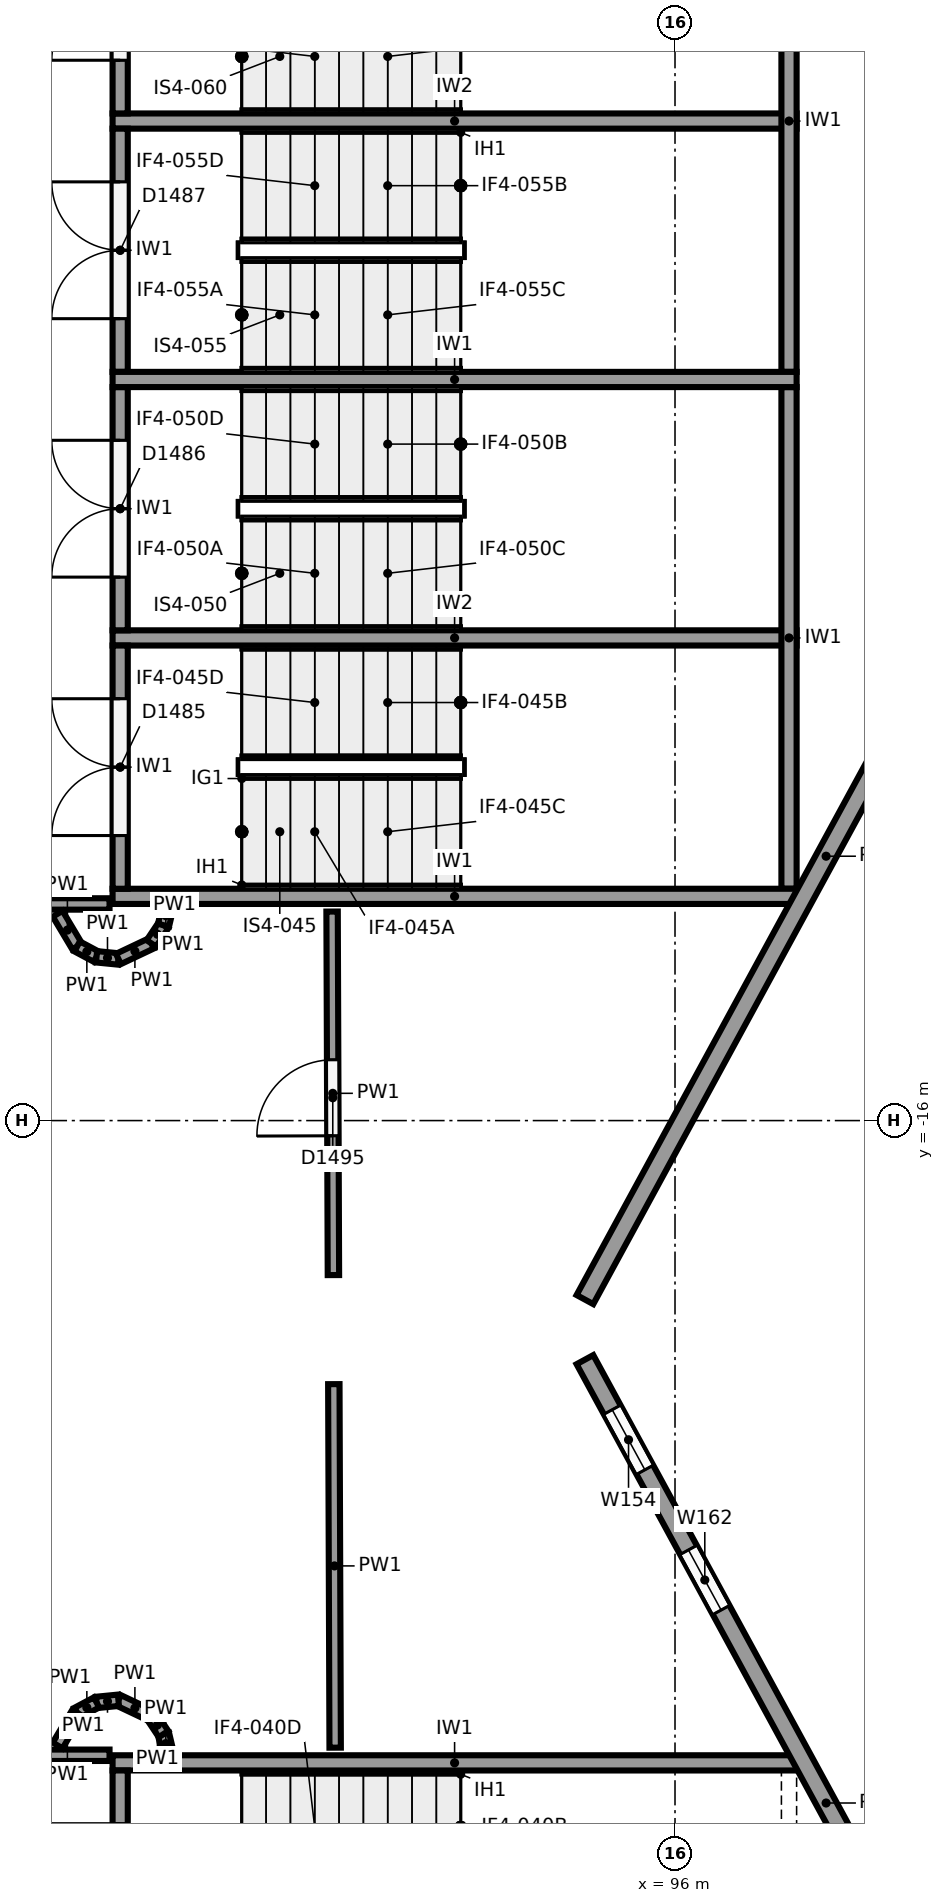
"""IFC4 building model, lengths in metres.
Left out: names, types, materials, properties, quantities, classifications, styles, units other than length and angle.
Written with IfcOpenShell. Run it as: python <this file> out.ifc"""

import sys

from ifc_helpers import new_model, si_unit, direction, frame, frame_2d, origin, origin_2d, place, context, subcontext, project, spatial, rectangle, circle, extrude, element, fill, save


model = new_model("IFC4")
c1 = context("Model", 3, precision=1e-05, world=origin(), true_north=direction((0.0, 1.0)))
c2 = subcontext(c1, "Body", "Model", "MODEL_VIEW")
j1 = project(units=[si_unit("LENGTHUNIT", "METRE"), si_unit("PLANEANGLEUNIT", "RADIAN")], contexts=[c1])
p1 = place(None, origin())
s1 = spatial("IfcSite", under=j1, at=p1, CompositionType="ELEMENT")
p2 = place(p1, origin())
s2 = spatial("IfcBuilding", under=s1, at=p2, CompositionType="ELEMENT")
p3 = place(p2, frame((0.0, 0.0, 18.0)))
s3 = spatial("IfcBuildingStorey", under=s2, at=p3, CompositionType="ELEMENT", Elevation=18.0)
p4 = place(p3, frame((94.6, -18.75, 0.0), z_axis=(0.0, 0.0, 1.0), x_axis=(1.0, 0.0, 0.0)))
e1 = element("IfcColumn", 1, at=p4, inside=s3, PredefinedType="COLUMN", context=c2, shape_type="SweptSolid", body=[
    extrude(circle(Radius=0.45, at=origin_2d()), origin(), (0.0, 0.0, 1.0), 6.0),
])
p5 = place(p3, frame((94.815, -19.145, 0.0), z_axis=(0.0, 0.0, 1.0), x_axis=(0.477867771117, -0.878431780691, 0.0)))
e2 = element("IfcWall", 2, at=p5, inside=s3, PredefinedType="SOLIDWALL", context=c2, shape_type="SweptSolid", body=[
    extrude(rectangle(XDim=13.28, YDim=0.25, at=frame_2d((6.64, 0.0))), origin(), (0.0, 0.0, 1.0), 4.3),
])
p6 = place(p5, frame((0.75, 0.0, 1.0)))
e3 = element("IfcOpeningElement", 3, at=p6, cuts=e2, PredefinedType="OPENING", context=c2, shape_type="SweptSolid", body=[
    extrude(rectangle(XDim=0.9, YDim=3.25, at=frame_2d((0.45, 1.625))), frame((0.0, 0.135, 0.0), z_axis=(0.0, -1.0, 0.0), x_axis=(1.0, 0.0, 0.0)), (0.0, 0.0, 1.0), 0.27),
])
p7 = place(p5, frame((2.85, 0.0, 1.0)))
e4 = element("IfcOpeningElement", 4, at=p7, cuts=e2, PredefinedType="OPENING", context=c2, shape_type="SweptSolid", body=[
    extrude(rectangle(XDim=0.9, YDim=3.25, at=frame_2d((0.45, 1.625))), frame((0.0, 0.135, 0.0), z_axis=(0.0, -1.0, 0.0), x_axis=(1.0, 0.0, 0.0)), (0.0, 0.0, 1.0), 0.27),
])
p8 = place(p5, frame((11.25, 0.0, 1.0)))
e5 = element("IfcOpeningElement", 5, at=p8, cuts=e2, PredefinedType="OPENING", context=c2, shape_type="SweptSolid", body=[
    extrude(rectangle(XDim=0.9, YDim=3.25, at=frame_2d((0.45, 1.625))), frame((0.0, 0.135, 0.0), z_axis=(0.0, -1.0, 0.0), x_axis=(1.0, 0.0, 0.0)), (0.0, 0.0, 1.0), 0.27),
])
p9 = place(p3, frame((101.161, -6.689, 0.0), z_axis=(0.0, 0.0, 1.0), x_axis=(-0.477867771117, -0.878431780691, 0.0)))
e6 = element("IfcWall", 6, at=p9, inside=s3, PredefinedType="SOLIDWALL", context=c2, shape_type="SweptSolid", body=[
    extrude(rectangle(XDim=13.28, YDim=0.25, at=frame_2d((6.64, 0.0))), origin(), (0.0, 0.0, 1.0), 4.3),
])
p10 = place(p3, frame((94.815, 5.855, 0.0), z_axis=(0.0, 0.0, 1.0), x_axis=(0.477867771117, -0.878431780691, 0.0)))
e7 = element("IfcWall", 7, at=p10, inside=s3, PredefinedType="SOLIDWALL", context=c2, shape_type="SweptSolid", body=[
    extrude(rectangle(XDim=13.28, YDim=0.25, at=frame_2d((6.64, 0.0))), origin(), (0.0, 0.0, 1.0), 4.3),
])
p11 = place(p10, frame((0.75, 0.0, 1.0)))
e8 = element("IfcOpeningElement", 8, at=p11, cuts=e7, PredefinedType="OPENING", context=c2, shape_type="SweptSolid", body=[
    extrude(rectangle(XDim=0.9, YDim=3.25, at=frame_2d((0.45, 1.625))), frame((0.0, 0.135, 0.0), z_axis=(0.0, -1.0, 0.0), x_axis=(1.0, 0.0, 0.0)), (0.0, 0.0, 1.0), 0.27),
])
p12 = place(p10, frame((2.85, 0.0, 1.0)))
e9 = element("IfcOpeningElement", 9, at=p12, cuts=e7, PredefinedType="OPENING", context=c2, shape_type="SweptSolid", body=[
    extrude(rectangle(XDim=0.9, YDim=3.25, at=frame_2d((0.45, 1.625))), frame((0.0, 0.135, 0.0), z_axis=(0.0, -1.0, 0.0), x_axis=(1.0, 0.0, 0.0)), (0.0, 0.0, 1.0), 0.27),
])
p13 = place(p10, frame((11.25, 0.0, 1.0)))
e10 = element("IfcOpeningElement", 10, at=p13, cuts=e7, PredefinedType="OPENING", context=c2, shape_type="SweptSolid", body=[
    extrude(rectangle(XDim=0.9, YDim=3.25, at=frame_2d((0.45, 1.625))), frame((0.0, 0.135, 0.0), z_axis=(0.0, -1.0, 0.0), x_axis=(1.0, 0.0, 0.0)), (0.0, 0.0, 1.0), 0.27),
])
p14 = place(p3, frame((97.6, -24.45, 0.0), z_axis=(0.0, 0.0, 1.0), x_axis=(-1.0, 0.0, 0.0)))
e11 = element("IfcWall", 11, at=p14, inside=s3, PredefinedType="SHEAR", context=c2, shape_type="SweptSolid", body=[
    extrude(rectangle(XDim=9.0, YDim=0.2, at=frame_2d((4.5, 0.0))), origin(), (0.0, 0.0, 1.0), 5.6),
])
p15 = place(p3, frame((97.5, -31.15, 0.0), z_axis=(0.0, 0.0, 1.0), x_axis=(0.0, 1.0, 0.0)))
e12 = element("IfcWall", 12, at=p15, inside=s3, PredefinedType="SHEAR", context=c2, shape_type="SweptSolid", body=[
    extrude(rectangle(XDim=6.6, YDim=0.2, at=frame_2d((3.3, 0.0))), origin(), (0.0, 0.0, 1.0), 5.6),
])
p16 = place(p3, frame((88.7, -27.75, 0.0), z_axis=(0.0, 0.0, 1.0), x_axis=(0.0, 1.0, 0.0)))
e13 = element("IfcWall", 13, at=p16, inside=s3, PredefinedType="SHEAR", context=c2, shape_type="SweptSolid", body=[
    extrude(rectangle(XDim=3.2, YDim=0.2, at=frame_2d((1.6, 0.0))), origin(), (0.0, 0.0, 1.0), 5.6),
])
p17 = place(p16, frame((0.7, 0.0, 0.0)))
e14 = element("IfcOpeningElement", 14, at=p17, cuts=e13, PredefinedType="OPENING", context=c2, shape_type="SweptSolid", body=[
    extrude(rectangle(XDim=1.8, YDim=2.1, at=frame_2d((0.9, 1.05))), frame((0.0, 0.11, 0.0), z_axis=(0.0, -1.0, 0.0), x_axis=(1.0, 0.0, 0.0)), (0.0, 0.0, 1.0), 0.22),
])
for number, where, z_axis, x_axis in (
    (15, (97.6, -13.05, 0.0), (0.0, 0.0, 1.0), (-1.0, 0.0, 0.0)),
    (16, (97.6, -6.25, 0.0), (0.0, 0.0, 1.0), (-1.0, 0.0, 0.0)),
):
    element("IfcWall", number, at=place(p3, frame(where, z_axis=z_axis, x_axis=x_axis)), inside=s3, PredefinedType="SHEAR", context=c2, shape_type="SweptSolid", body=[
        extrude(rectangle(XDim=9.0, YDim=0.2, at=frame_2d((4.5, 0.0))), origin(), (0.0, 0.0, 1.0), 5.6),
    ])
for number, where, z_axis, x_axis in (
    (17, (97.5, -12.95, 0.0), (0.0, 0.0, 1.0), (0.0, 1.0, 0.0)),
    (18, (97.5, -6.15, 0.0), (0.0, 0.0, 1.0), (0.0, 1.0, 0.0)),
):
    element("IfcWall", number, at=place(p3, frame(where, z_axis=z_axis, x_axis=x_axis)), inside=s3, PredefinedType="SHEAR", context=c2, shape_type="SweptSolid", body=[
        extrude(rectangle(XDim=6.6, YDim=0.2, at=frame_2d((3.3, 0.0))), origin(), (0.0, 0.0, 1.0), 5.6),
    ])
for number, where, z_axis, x_axis in (
    (19, (97.6, -9.65, 0.0), (0.0, 0.0, 1.0), (-1.0, 0.0, 0.0)),
    (20, (97.6, -2.85, 0.0), (0.0, 0.0, 1.0), (-1.0, 0.0, 0.0)),
):
    element("IfcWall", number, at=place(p3, frame(where, z_axis=z_axis, x_axis=x_axis)), inside=s3, PredefinedType="SHEAR", context=c2, shape_type="SweptSolid", body=[
        extrude(rectangle(XDim=9.0, YDim=0.2, at=frame_2d((4.5, 0.0))), origin(), (0.0, 0.0, 1.0), 5.6),
    ])
p18 = place(p3, frame((88.7, -12.95, 0.0), z_axis=(0.0, 0.0, 1.0), x_axis=(0.0, 1.0, 0.0)))
e21 = element("IfcWall", 21, at=p18, inside=s3, PredefinedType="SHEAR", context=c2, shape_type="SweptSolid", body=[
    extrude(rectangle(XDim=3.2, YDim=0.2, at=frame_2d((1.6, 0.0))), origin(), (0.0, 0.0, 1.0), 5.6),
])
p19 = place(p18, frame((0.7, 0.0, 0.0)))
e22 = element("IfcOpeningElement", 22, at=p19, cuts=e21, PredefinedType="OPENING", context=c2, shape_type="SweptSolid", body=[
    extrude(rectangle(XDim=1.8, YDim=2.1, at=frame_2d((0.9, 1.05))), frame((0.0, 0.11, 0.0), z_axis=(0.0, -1.0, 0.0), x_axis=(1.0, 0.0, 0.0)), (0.0, 0.0, 1.0), 0.22),
])
p20 = place(p3, frame((88.7, -9.55, 0.0), z_axis=(0.0, 0.0, 1.0), x_axis=(0.0, 1.0, 0.0)))
e23 = element("IfcWall", 23, at=p20, inside=s3, PredefinedType="SHEAR", context=c2, shape_type="SweptSolid", body=[
    extrude(rectangle(XDim=3.2, YDim=0.2, at=frame_2d((1.6, 0.0))), origin(), (0.0, 0.0, 1.0), 5.6),
])
p21 = place(p20, frame((0.7, 0.0, 0.0)))
e24 = element("IfcOpeningElement", 24, at=p21, cuts=e23, PredefinedType="OPENING", context=c2, shape_type="SweptSolid", body=[
    extrude(rectangle(XDim=1.8, YDim=2.1, at=frame_2d((0.9, 1.05))), frame((0.0, 0.11, 0.0), z_axis=(0.0, -1.0, 0.0), x_axis=(1.0, 0.0, 0.0)), (0.0, 0.0, 1.0), 0.22),
])
p22 = place(p3, frame((88.7, -6.15, 0.0), z_axis=(0.0, 0.0, 1.0), x_axis=(0.0, 1.0, 0.0)))
e25 = element("IfcWall", 25, at=p22, inside=s3, PredefinedType="SHEAR", context=c2, shape_type="SweptSolid", body=[
    extrude(rectangle(XDim=3.2, YDim=0.2, at=frame_2d((1.6, 0.0))), origin(), (0.0, 0.0, 1.0), 5.6),
])
p23 = place(p22, frame((0.7, 0.0, 0.0)))
e26 = element("IfcOpeningElement", 26, at=p23, cuts=e25, PredefinedType="OPENING", context=c2, shape_type="SweptSolid", body=[
    extrude(rectangle(XDim=1.8, YDim=2.1, at=frame_2d((0.9, 1.05))), frame((0.0, 0.11, 0.0), z_axis=(0.0, -1.0, 0.0), x_axis=(1.0, 0.0, 0.0)), (0.0, 0.0, 1.0), 0.22),
])
p24 = place(p3, frame((88.7, -2.75, 0.0), z_axis=(0.0, 0.0, 1.0), x_axis=(0.0, 1.0, 0.0)))
e27 = element("IfcWall", 27, at=p24, inside=s3, PredefinedType="SHEAR", context=c2, shape_type="SweptSolid", body=[
    extrude(rectangle(XDim=3.2, YDim=0.2, at=frame_2d((1.6, 0.0))), origin(), (0.0, 0.0, 1.0), 5.6),
])
p25 = place(p24, frame((0.7, 0.0, 0.0)))
e28 = element("IfcOpeningElement", 28, at=p25, cuts=e27, PredefinedType="OPENING", context=c2, shape_type="SweptSolid", body=[
    extrude(rectangle(XDim=1.8, YDim=2.1, at=frame_2d((0.9, 1.05))), frame((0.0, 0.11, 0.0), z_axis=(0.0, -1.0, 0.0), x_axis=(1.0, 0.0, 0.0)), (0.0, 0.0, 1.0), 0.22),
])
for number, where, z_axis, x_axis in (
    (29, (88.56, -24.35, 0.0), (0.0, 0.0, 1.0), (-1.0, 0.0, 0.0)),
    (30, (85.577, -13.15, 0.0), (0.0, 0.0, 1.0), (1.0, 0.0, 0.0)),
):
    element("IfcWall", number, at=place(p3, frame(where, z_axis=z_axis, x_axis=x_axis)), inside=s3, PredefinedType="PARTITIONING", context=c2, shape_type="SweptSolid", body=[
        extrude(rectangle(XDim=2.983, YDim=0.15, at=frame_2d((1.491, 0.0))), origin(), (0.0, 0.0, 1.0), 5.6),
    ])
p26 = place(p3, frame((91.506, -18.033, 0.0), z_axis=(0.0, 0.0, 1.0), x_axis=(-0.003624274308, 0.999993432296, 0.0)))
e31 = element("IfcWall", 31, at=p26, inside=s3, PredefinedType="PARTITIONING", context=c2, shape_type="SweptSolid", body=[
    extrude(rectangle(XDim=4.783, YDim=0.15, at=frame_2d((2.391, 0.0))), origin(), (0.0, 0.0, 1.0), 5.6),
])
p27 = place(p26, frame((1.833, 0.0, 0.0)))
e32 = element("IfcOpeningElement", 32, at=p27, cuts=e31, PredefinedType="OPENING", context=c2, shape_type="SweptSolid", body=[
    extrude(rectangle(XDim=1.0, YDim=2.1, at=frame_2d((0.5, 1.05))), frame((0.0, 0.085, 0.0), z_axis=(0.0, -1.0, 0.0), x_axis=(1.0, 0.0, 0.0)), (0.0, 0.0, 1.0), 0.17),
])
p28 = place(p3, frame((91.511, -19.467, 0.0), z_axis=(0.0, 0.0, 1.0), x_axis=(0.00367531974, -0.99999324599, 0.0)))
e33 = element("IfcWall", 33, at=p28, inside=s3, PredefinedType="PARTITIONING", context=c2, shape_type="SweptSolid", body=[
    extrude(rectangle(XDim=4.783, YDim=0.15, at=frame_2d((2.391, 0.0))), origin(), (0.0, 0.0, 1.0), 5.6),
])
p29 = place(p3, frame((89.33, -24.322, 0.0), z_axis=(0.0, 0.0, 1.0), x_axis=(-0.230253879357, 0.973130593004, 0.0)))
e34 = element("IfcWall", 34, at=p29, inside=s3, PredefinedType="PARTITIONING", context=c2, shape_type="SweptSolid", body=[
    extrude(rectangle(XDim=0.258, YDim=0.15, at=frame_2d((0.129, 0.0))), origin(), (0.0, 0.0, 1.0), 5.6),
])
p30 = place(p3, frame((89.271, -24.071, 0.0), z_axis=(0.0, 0.0, 1.0), x_axis=(-0.555678694372, 0.831397130511, 0.0)))
e35 = element("IfcWall", 35, at=p30, inside=s3, PredefinedType="PARTITIONING", context=c2, shape_type="SweptSolid", body=[
    extrude(rectangle(XDim=0.288, YDim=0.15, at=frame_2d((0.144, 0.0))), origin(), (0.0, 0.0, 1.0), 5.6),
])
p31 = place(p3, frame((89.111, -23.832, 0.0), z_axis=(0.0, 0.0, 1.0), x_axis=(-0.90398642908, 0.427561148889, 0.0)))
e36 = element("IfcWall", 36, at=p31, inside=s3, PredefinedType="PARTITIONING", context=c2, shape_type="SweptSolid", body=[
    extrude(rectangle(XDim=0.48, YDim=0.15, at=frame_2d((0.24, 0.0))), origin(), (0.0, 0.0, 1.0), 5.6),
])
for number, where, z_axis, x_axis in (
    (37, (88.677, -23.626, 0.0), (0.0, 0.0, 1.0), (-0.995, -0.098, 0.0)),
    (38, (88.389, -23.655, 0.0), (0.0, 0.0, 1.0), (-0.882, -0.472, 0.0)),
):
    element("IfcWall", number, at=place(p3, frame(where, z_axis=z_axis, x_axis=x_axis)), inside=s3, PredefinedType="PARTITIONING", context=c2, shape_type="SweptSolid", body=[
        extrude(rectangle(XDim=0.289, YDim=0.15, at=frame_2d((0.145, 0.0))), origin(), (0.0, 0.0, 1.0), 5.6),
    ])
for number, where, z_axis, x_axis in (
    (39, (88.134, -23.791, 0.0), (0.0, 0.0, 1.0), (-0.513, -0.858, 0.0)),
    (40, (87.877, -13.279, 0.0), (0.0, 0.0, 1.0), (0.513, -0.858, 0.0)),
):
    element("IfcWall", number, at=place(p3, frame(where, z_axis=z_axis, x_axis=x_axis)), inside=s3, PredefinedType="PARTITIONING", context=c2, shape_type="SweptSolid", body=[
        extrude(rectangle(XDim=0.5, YDim=0.15, at=frame_2d((0.25, 0.0))), origin(), (0.0, 0.0, 1.0), 5.6),
    ])
for number, where, z_axis, x_axis in (
    (41, (88.134, -13.709, 0.0), (0.0, 0.0, 1.0), (0.882, -0.472, 0.0)),
    (42, (88.389, -13.845, 0.0), (0.0, 0.0, 1.0), (0.995, -0.098, 0.0)),
):
    element("IfcWall", number, at=place(p3, frame(where, z_axis=z_axis, x_axis=x_axis)), inside=s3, PredefinedType="PARTITIONING", context=c2, shape_type="SweptSolid", body=[
        extrude(rectangle(XDim=0.289, YDim=0.15, at=frame_2d((0.145, 0.0))), origin(), (0.0, 0.0, 1.0), 5.6),
    ])
p32 = place(p3, frame((88.677, -13.874, 0.0), z_axis=(0.0, 0.0, 1.0), x_axis=(0.90398642908, 0.427561148889, 0.0)))
e43 = element("IfcWall", 43, at=p32, inside=s3, PredefinedType="PARTITIONING", context=c2, shape_type="SweptSolid", body=[
    extrude(rectangle(XDim=0.48, YDim=0.15, at=frame_2d((0.24, 0.0))), origin(), (0.0, 0.0, 1.0), 5.6),
])
p33 = place(p3, frame((89.111, -13.668, 0.0), z_axis=(0.0, 0.0, 1.0), x_axis=(0.555678694372, 0.831397130511, 0.0)))
e44 = element("IfcWall", 44, at=p33, inside=s3, PredefinedType="PARTITIONING", context=c2, shape_type="SweptSolid", body=[
    extrude(rectangle(XDim=0.288, YDim=0.15, at=frame_2d((0.144, 0.0))), origin(), (0.0, 0.0, 1.0), 5.6),
])
p34 = place(p3, frame((89.271, -13.429, 0.0), z_axis=(0.0, 0.0, 1.0), x_axis=(0.230253879357, 0.973130593004, 0.0)))
e45 = element("IfcWall", 45, at=p34, inside=s3, PredefinedType="PARTITIONING", context=c2, shape_type="SweptSolid", body=[
    extrude(rectangle(XDim=0.258, YDim=0.15, at=frame_2d((0.129, 0.0))), origin(), (0.0, 0.0, 1.0), 5.6),
])
p35 = place(p6, origin())
e46 = element("IfcWindow", 46, at=p35, inside=s3, PartitioningType="SINGLE_PANEL", PredefinedType="WINDOW", context=c2, shape_type="SweptSolid", body=[
    extrude(rectangle(XDim=0.9, YDim=3.25, at=frame_2d((0.45, 1.625))), frame((0.0, 0.03, 0.0), z_axis=(0.0, -1.0, 0.0), x_axis=(1.0, 0.0, 0.0)), (0.0, 0.0, 1.0), 0.06),
])
fill(e3, e46)
p36 = place(p7, origin())
e47 = element("IfcWindow", 47, at=p36, inside=s3, PartitioningType="SINGLE_PANEL", PredefinedType="WINDOW", context=c2, shape_type="SweptSolid", body=[
    extrude(rectangle(XDim=0.9, YDim=3.25, at=frame_2d((0.45, 1.625))), frame((0.0, 0.03, 0.0), z_axis=(0.0, -1.0, 0.0), x_axis=(1.0, 0.0, 0.0)), (0.0, 0.0, 1.0), 0.06),
])
fill(e4, e47)
p37 = place(p19, origin())
e48 = element("IfcDoor", 48, at=p37, inside=s3, OperationType="DOUBLE_DOOR_SINGLE_SWING", PredefinedType="DOOR", context=c2, shape_type="SweptSolid", body=[
    extrude(rectangle(XDim=1.8, YDim=2.1, at=frame_2d((0.9, 1.05))), frame((0.0, 0.025, 0.0), z_axis=(0.0, -1.0, 0.0), x_axis=(1.0, 0.0, 0.0)), (0.0, 0.0, 1.0), 0.05),
])
fill(e22, e48)
p38 = place(p21, origin())
e49 = element("IfcDoor", 49, at=p38, inside=s3, OperationType="DOUBLE_DOOR_SINGLE_SWING", PredefinedType="DOOR", context=c2, shape_type="SweptSolid", body=[
    extrude(rectangle(XDim=1.8, YDim=2.1, at=frame_2d((0.9, 1.05))), frame((0.0, 0.025, 0.0), z_axis=(0.0, -1.0, 0.0), x_axis=(1.0, 0.0, 0.0)), (0.0, 0.0, 1.0), 0.05),
])
fill(e24, e49)
p39 = place(p23, origin())
e50 = element("IfcDoor", 50, at=p39, inside=s3, OperationType="DOUBLE_DOOR_SINGLE_SWING", PredefinedType="DOOR", context=c2, shape_type="SweptSolid", body=[
    extrude(rectangle(XDim=1.8, YDim=2.1, at=frame_2d((0.9, 1.05))), frame((0.0, 0.025, 0.0), z_axis=(0.0, -1.0, 0.0), x_axis=(1.0, 0.0, 0.0)), (0.0, 0.0, 1.0), 0.05),
])
fill(e26, e50)
p40 = place(p25, origin())
e51 = element("IfcDoor", 51, at=p40, inside=s3, OperationType="DOUBLE_DOOR_SINGLE_SWING", PredefinedType="DOOR", context=c2, shape_type="SweptSolid", body=[
    extrude(rectangle(XDim=1.8, YDim=2.1, at=frame_2d((0.9, 1.05))), frame((0.0, 0.025, 0.0), z_axis=(0.0, -1.0, 0.0), x_axis=(1.0, 0.0, 0.0)), (0.0, 0.0, 1.0), 0.05),
])
fill(e28, e51)
p41 = place(p27, origin())
e52 = element("IfcDoor", 52, at=p41, inside=s3, OperationType="SINGLE_SWING_LEFT", PredefinedType="DOOR", context=c2, shape_type="SweptSolid", body=[
    extrude(rectangle(XDim=1.0, YDim=2.1, at=frame_2d((0.5, 1.05))), frame((0.0, 0.025, 0.0), z_axis=(0.0, -1.0, 0.0), x_axis=(1.0, 0.0, 0.0)), (0.0, 0.0, 1.0), 0.05),
])
fill(e32, e52)
save(model, sys.argv[1])
